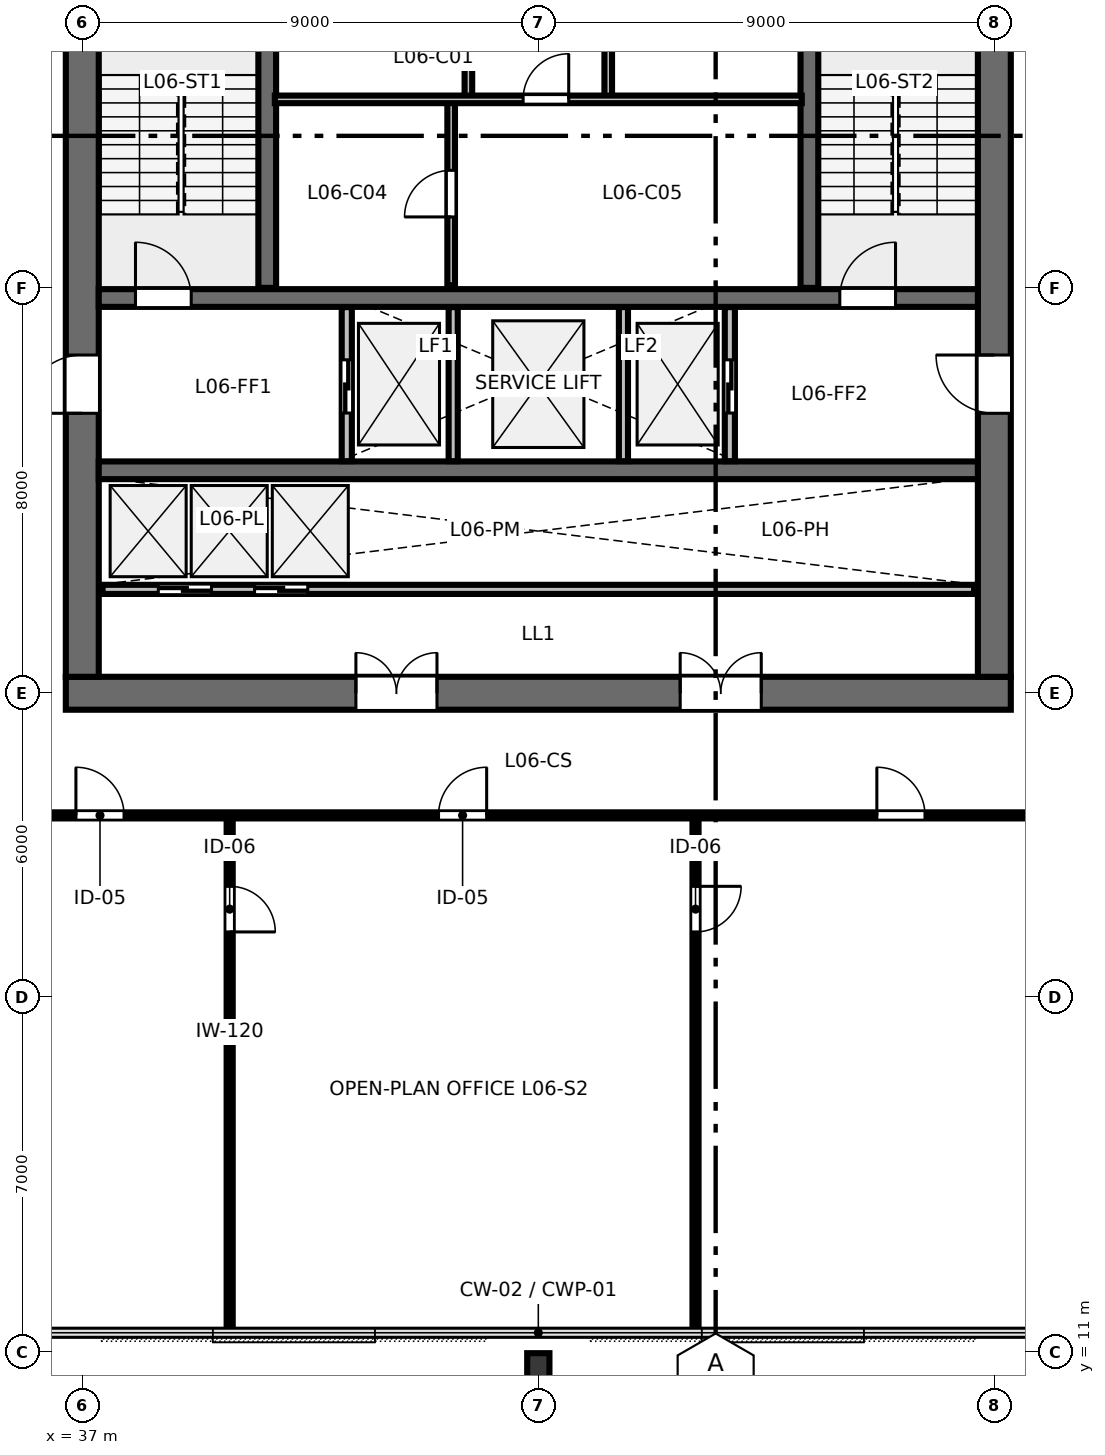
"""IFC4 building model, lengths in metres.
Left out: names, types, materials, properties, quantities, classifications, styles, units other than length and angle.
Written with IfcOpenShell. Run it as: python <this file> out.ifc"""

import sys

from ifc_helpers import new_model, si_unit, direction, frame, frame_2d, origin, origin_2d, place, context, subcontext, project, spatial, rectangle, i_section, extrude, element, fill, save


model = new_model("IFC4")
c1 = context("Model", 3, precision=1e-05, world=origin(), true_north=direction((0.0, 1.0)))
c2 = subcontext(c1, "Body", "Model", "MODEL_VIEW")
j1 = project(units=[si_unit("LENGTHUNIT", "METRE"), si_unit("PLANEANGLEUNIT", "RADIAN")], contexts=[c1])
p1 = place(None, origin())
s1 = spatial("IfcSite", under=j1, at=p1, CompositionType="ELEMENT")
p2 = place(p1, origin())
s2 = spatial("IfcBuilding", under=s1, at=p2, CompositionType="ELEMENT")
p3 = place(p2, frame((0.0, 0.0, 28.0)))
s3 = spatial("IfcBuildingStorey", under=s2, at=p3, CompositionType="ELEMENT", Elevation=28.0)
p4 = place(p3, frame((36.675, 24.0, 0.0), z_axis=(0.0, 0.0, 1.0), x_axis=(1.0, 0.0, 0.0)))
e1 = element("IfcWall", 1, at=p4, inside=s3, PredefinedType="SHEAR", context=c2, shape_type="SweptSolid", body=[
    extrude(rectangle(XDim=18.65, YDim=0.65, at=frame_2d((9.325, 0.0))), origin(), (0.0, 0.0, 1.0), 3.36),
])
p5 = place(p4, frame((5.725, 0.0, 0.0)))
e2 = element("IfcOpeningElement", 2, at=p5, cuts=e1, PredefinedType="OPENING", context=c2, shape_type="SweptSolid", body=[
    extrude(rectangle(XDim=1.6, YDim=2.15, at=frame_2d((0.8, 1.075))), frame((0.0, 0.335, 0.0), z_axis=(0.0, -1.0, 0.0), x_axis=(1.0, 0.0, 0.0)), (0.0, 0.0, 1.0), 0.67),
])
p6 = place(p4, frame((12.125, 0.0, 0.0)))
e3 = element("IfcOpeningElement", 3, at=p6, cuts=e1, PredefinedType="OPENING", context=c2, shape_type="SweptSolid", body=[
    extrude(rectangle(XDim=1.6, YDim=2.15, at=frame_2d((0.8, 1.075))), frame((0.0, 0.335, 0.0), z_axis=(0.0, -1.0, 0.0), x_axis=(1.0, 0.0, 0.0)), (0.0, 0.0, 1.0), 0.67),
])
p7 = place(p3, frame((37.0, 24.325, 0.0), z_axis=(0.0, 0.0, 1.0), x_axis=(0.0, 1.0, 0.0)))
e4 = element("IfcWall", 4, at=p7, inside=s3, PredefinedType="SHEAR", context=c2, shape_type="SweptSolid", body=[
    extrude(rectangle(XDim=15.35, YDim=0.65, at=frame_2d((7.675, 0.0))), origin(), (0.0, 0.0, 1.0), 3.36),
])
p8 = place(p7, frame((5.2, 0.0, 0.0)))
e5 = element("IfcOpeningElement", 5, at=p8, cuts=e4, PredefinedType="OPENING", context=c2, shape_type="SweptSolid", body=[
    extrude(rectangle(XDim=1.15, YDim=2.15, at=frame_2d((0.575, 1.075))), frame((0.0, 0.335, 0.0), z_axis=(0.0, -1.0, 0.0), x_axis=(1.0, 0.0, 0.0)), (0.0, 0.0, 1.0), 0.67),
])
p9 = place(p3, frame((55.0, 24.325, 0.0), z_axis=(0.0, 0.0, 1.0), x_axis=(0.0, 1.0, 0.0)))
e6 = element("IfcWall", 6, at=p9, inside=s3, PredefinedType="SHEAR", context=c2, shape_type="SweptSolid", body=[
    extrude(rectangle(XDim=15.35, YDim=0.65, at=frame_2d((7.675, 0.0))), origin(), (0.0, 0.0, 1.0), 3.36),
])
p10 = place(p9, frame((5.2, 0.0, 0.0)))
e7 = element("IfcOpeningElement", 7, at=p10, cuts=e6, PredefinedType="OPENING", context=c2, shape_type="SweptSolid", body=[
    extrude(rectangle(XDim=1.15, YDim=2.15, at=frame_2d((0.575, 1.075))), frame((0.0, 0.335, 0.0), z_axis=(0.0, -1.0, 0.0), x_axis=(1.0, 0.0, 0.0)), (0.0, 0.0, 1.0), 0.67),
])
p11 = place(p3, frame((37.325, 31.8, 0.0), z_axis=(0.0, 0.0, 1.0), x_axis=(1.0, 0.0, 0.0)))
e8 = element("IfcWall", 8, at=p11, inside=s3, PredefinedType="SHEAR", context=c2, shape_type="SweptSolid", body=[
    extrude(rectangle(XDim=17.35, YDim=0.35, at=frame_2d((8.675, 0.0))), origin(), (0.0, 0.0, 1.0), 3.36),
])
p12 = place(p11, frame((0.725, 0.0, 0.0)))
e9 = element("IfcOpeningElement", 9, at=p12, cuts=e8, PredefinedType="OPENING", context=c2, shape_type="SweptSolid", body=[
    extrude(rectangle(XDim=1.1, YDim=2.15, at=frame_2d((0.55, 1.075))), frame((0.0, 0.185, 0.0), z_axis=(0.0, -1.0, 0.0), x_axis=(1.0, 0.0, 0.0)), (0.0, 0.0, 1.0), 0.37),
])
p13 = place(p11, frame((14.625, 0.0, 0.0)))
e10 = element("IfcOpeningElement", 10, at=p13, cuts=e8, PredefinedType="OPENING", context=c2, shape_type="SweptSolid", body=[
    extrude(rectangle(XDim=1.1, YDim=2.15, at=frame_2d((0.55, 1.075))), frame((0.0, 0.185, 0.0), z_axis=(0.0, -1.0, 0.0), x_axis=(1.0, 0.0, 0.0)), (0.0, 0.0, 1.0), 0.37),
])
p14 = place(p3, frame((37.325, 28.4, 0.0), z_axis=(0.0, 0.0, 1.0), x_axis=(1.0, 0.0, 0.0)))
e11 = element("IfcWall", 11, at=p14, inside=s3, PredefinedType="SHEAR", context=c2, shape_type="SweptSolid", body=[
    extrude(rectangle(XDim=17.35, YDim=0.35, at=frame_2d((8.675, 0.0))), origin(), (0.0, 0.0, 1.0), 3.36),
])
p15 = place(p3, frame((46.0, 10.72, 0.0), z_axis=(0.0, 0.0, 1.0), x_axis=(1.0, 0.0, 0.0)))
e12 = element("IfcColumn", 12, at=p15, inside=s3, PredefinedType="COLUMN", context=c2, shape_type="SweptSolid", body=[
    extrude(i_section(OverallWidth=0.439, OverallDepth=0.514, WebThickness=0.06, FlangeThickness=0.097, FilletRadius=0.025, at=origin_2d()), origin(), (0.0, 0.0, 1.0), 3.358),
])
for number, where, z_axis, x_axis in (
    (13, (40.65, 32.0, 0.0), (0.0, 0.0, 1.0), (0.0, 1.0, 0.0)),
    (14, (51.35, 32.0, 0.0), (0.0, 0.0, 1.0), (0.0, 1.0, 0.0)),
):
    element("IfcWall", number, at=place(p3, frame(where, z_axis=z_axis, x_axis=x_axis)), inside=s3, PredefinedType="SHEAR", context=c2, shape_type="SweptSolid", body=[
        extrude(rectangle(XDim=7.7, YDim=0.35, at=frame_2d((3.85, 0.0))), origin(), (0.0, 0.0, 1.0), 3.6),
    ])
p16 = place(p3, frame((44.62, 35.72, 0.0), z_axis=(0.0, 0.0, 1.0), x_axis=(0.0, 1.0, 0.0)))
e15 = element("IfcWall", 15, at=p16, inside=s3, PredefinedType="PARTITIONING", context=c2, shape_type="SweptSolid", body=[
    extrude(rectangle(XDim=3.93, YDim=0.15, at=frame_2d((1.965, 0.0))), origin(), (0.0, 0.0, 1.0), 3.36),
])
p17 = place(p16, frame((1.5, 0.0, 0.0)))
e16 = element("IfcOpeningElement", 16, at=p17, cuts=e15, PredefinedType="OPENING", context=c2, shape_type="SweptSolid", body=[
    extrude(rectangle(XDim=0.9, YDim=2.15, at=frame_2d((0.45, 1.075))), frame((0.0, 0.085, 0.0), z_axis=(0.0, -1.0, 0.0), x_axis=(1.0, 0.0, 0.0)), (0.0, 0.0, 1.0), 0.17),
])
p18 = place(p3, frame((47.38, 35.72, 0.0), z_axis=(0.0, 0.0, 1.0), x_axis=(0.0, 1.0, 0.0)))
e17 = element("IfcWall", 17, at=p18, inside=s3, PredefinedType="PARTITIONING", context=c2, shape_type="SweptSolid", body=[
    extrude(rectangle(XDim=3.93, YDim=0.15, at=frame_2d((1.965, 0.0))), origin(), (0.0, 0.0, 1.0), 3.36),
])
p19 = place(p18, frame((1.5, 0.0, 0.0)))
e18 = element("IfcOpeningElement", 18, at=p19, cuts=e17, PredefinedType="OPENING", context=c2, shape_type="SweptSolid", body=[
    extrude(rectangle(XDim=0.9, YDim=2.15, at=frame_2d((0.45, 1.075))), frame((0.0, 0.085, 0.0), z_axis=(0.0, -1.0, 0.0), x_axis=(1.0, 0.0, 0.0)), (0.0, 0.0, 1.0), 0.17),
])
p20 = place(p3, frame((44.28, 32.05, 0.0), z_axis=(0.0, 0.0, 1.0), x_axis=(0.0, 1.0, 0.0)))
e19 = element("IfcWall", 19, at=p20, inside=s3, PredefinedType="PARTITIONING", context=c2, shape_type="SweptSolid", body=[
    extrude(rectangle(XDim=3.67, YDim=0.15, at=frame_2d((1.835, 0.0))), origin(), (0.0, 0.0, 1.0), 3.36),
])
p21 = place(p20, frame((1.35, 0.0, 0.0)))
e20 = element("IfcOpeningElement", 20, at=p21, cuts=e19, PredefinedType="OPENING", context=c2, shape_type="SweptSolid", body=[
    extrude(rectangle(XDim=0.92, YDim=2.15, at=frame_2d((0.46, 1.075))), frame((0.0, 0.085, 0.0), z_axis=(0.0, -1.0, 0.0), x_axis=(1.0, 0.0, 0.0)), (0.0, 0.0, 1.0), 0.17),
])
p22 = place(p3, frame((40.8, 35.72, 0.0), z_axis=(0.0, 0.0, 1.0), x_axis=(1.0, 0.0, 0.0)))
e21 = element("IfcWall", 21, at=p22, inside=s3, PredefinedType="PARTITIONING", context=c2, shape_type="SweptSolid", body=[
    extrude(rectangle(XDim=10.4, YDim=0.15, at=frame_2d((5.2, 0.0))), origin(), (0.0, 0.0, 1.0), 3.36),
])
p23 = place(p22, frame((4.9, 0.0, 0.0)))
e22 = element("IfcOpeningElement", 22, at=p23, cuts=e21, PredefinedType="OPENING", context=c2, shape_type="SweptSolid", body=[
    extrude(rectangle(XDim=0.9, YDim=2.15, at=frame_2d((0.45, 1.075))), frame((0.0, 0.085, 0.0), z_axis=(0.0, -1.0, 0.0), x_axis=(1.0, 0.0, 0.0)), (0.0, 0.0, 1.0), 0.17),
])
p24 = place(p3, frame((42.22, 28.58, 0.0), z_axis=(0.0, 0.0, 1.0), x_axis=(0.0, 1.0, 0.0)))
e23 = element("IfcWall", 23, at=p24, inside=s3, PredefinedType="PARTITIONING", context=c2, shape_type="SweptSolid", body=[
    extrude(rectangle(XDim=3.04, YDim=0.2, at=frame_2d((1.52, 0.0))), origin(), (0.0, 0.0, 1.0), 3.36),
])
p25 = place(p24, frame((0.95, 0.0, 0.0)))
e24 = element("IfcOpeningElement", 24, at=p25, cuts=e23, PredefinedType="OPENING", context=c2, shape_type="SweptSolid", body=[
    extrude(rectangle(XDim=1.05, YDim=2.15, at=frame_2d((0.525, 1.075))), frame((0.0, 0.11, 0.0), z_axis=(0.0, -1.0, 0.0), x_axis=(1.0, 0.0, 0.0)), (0.0, 0.0, 1.0), 0.22),
])
p26 = place(p3, frame((49.78, 28.58, 0.0), z_axis=(0.0, 0.0, 1.0), x_axis=(0.0, 1.0, 0.0)))
e25 = element("IfcWall", 25, at=p26, inside=s3, PredefinedType="PARTITIONING", context=c2, shape_type="SweptSolid", body=[
    extrude(rectangle(XDim=3.04, YDim=0.2, at=frame_2d((1.52, 0.0))), origin(), (0.0, 0.0, 1.0), 3.36),
])
p27 = place(p26, frame((0.95, 0.0, 0.0)))
e26 = element("IfcOpeningElement", 26, at=p27, cuts=e25, PredefinedType="OPENING", context=c2, shape_type="SweptSolid", body=[
    extrude(rectangle(XDim=1.05, YDim=2.15, at=frame_2d((0.525, 1.075))), frame((0.0, 0.11, 0.0), z_axis=(0.0, -1.0, 0.0), x_axis=(1.0, 0.0, 0.0)), (0.0, 0.0, 1.0), 0.22),
])
for number, where, z_axis, x_axis in (
    (27, (44.32, 28.58, 0.0), (0.0, 0.0, 1.0), (0.0, 1.0, 0.0)),
    (28, (47.68, 28.58, 0.0), (0.0, 0.0, 1.0), (0.0, 1.0, 0.0)),
):
    element("IfcWall", number, at=place(p3, frame(where, z_axis=z_axis, x_axis=x_axis)), inside=s3, PredefinedType="PARTITIONING", context=c2, shape_type="SweptSolid", body=[
        extrude(rectangle(XDim=3.04, YDim=0.18, at=frame_2d((1.52, 0.0))), origin(), (0.0, 0.0, 1.0), 3.36),
    ])
p28 = place(p3, frame((37.4, 26.05, 0.0), z_axis=(0.0, 0.0, 1.0), x_axis=(1.0, 0.0, 0.0)))
e29 = element("IfcWall", 29, at=p28, inside=s3, PredefinedType="PARTITIONING", context=c2, shape_type="SweptSolid", body=[
    extrude(rectangle(XDim=17.2, YDim=0.18, at=frame_2d((8.6, 0.0))), origin(), (0.0, 0.0, 1.0), 3.36),
])
p29 = place(p28, frame((1.1, 0.0, 0.0)))
e30 = element("IfcOpeningElement", 30, at=p29, cuts=e29, PredefinedType="OPENING", context=c2, shape_type="SweptSolid", body=[
    extrude(rectangle(XDim=1.05, YDim=2.15, at=frame_2d((0.525, 1.075))), frame((0.0, 0.1, 0.0), z_axis=(0.0, -1.0, 0.0), x_axis=(1.0, 0.0, 0.0)), (0.0, 0.0, 1.0), 0.2),
])
p30 = place(p28, frame((3.0, 0.0, 0.0)))
e31 = element("IfcOpeningElement", 31, at=p30, cuts=e29, PredefinedType="OPENING", context=c2, shape_type="SweptSolid", body=[
    extrude(rectangle(XDim=1.05, YDim=2.15, at=frame_2d((0.525, 1.075))), frame((0.0, 0.1, 0.0), z_axis=(0.0, -1.0, 0.0), x_axis=(1.0, 0.0, 0.0)), (0.0, 0.0, 1.0), 0.2),
])
p31 = place(p3, frame((39.909, 21.59, 0.0), z_axis=(0.0, 0.0, 1.0), x_axis=(0.0, -1.0, 0.0)))
e32 = element("IfcWall", 32, at=p31, inside=s3, PredefinedType="PARTITIONING", context=c2, shape_type="SweptSolid", body=[
    extrude(rectangle(XDim=10.21, YDim=0.12, at=frame_2d((5.105, 0.0))), origin(), (0.0, 0.0, 1.0), 2.64),
])
p32 = place(p31, frame((1.4, 0.0, 0.0)))
e33 = element("IfcOpeningElement", 33, at=p32, cuts=e32, PredefinedType="OPENING", context=c2, shape_type="SweptSolid", body=[
    extrude(rectangle(XDim=0.9, YDim=2.15, at=frame_2d((0.45, 1.075))), frame((0.0, 0.07, 0.0), z_axis=(0.0, -1.0, 0.0), x_axis=(1.0, 0.0, 0.0)), (0.0, 0.0, 1.0), 0.14),
])
p33 = place(p3, frame((49.102, 21.59, 0.0), z_axis=(0.0, 0.0, 1.0), x_axis=(0.0, -1.0, 0.0)))
e34 = element("IfcWall", 34, at=p33, inside=s3, PredefinedType="PARTITIONING", context=c2, shape_type="SweptSolid", body=[
    extrude(rectangle(XDim=10.21, YDim=0.12, at=frame_2d((5.105, 0.0))), origin(), (0.0, 0.0, 1.0), 2.64),
])
p34 = place(p33, frame((1.4, 0.0, 0.0)))
e35 = element("IfcOpeningElement", 35, at=p34, cuts=e34, PredefinedType="OPENING", context=c2, shape_type="SweptSolid", body=[
    extrude(rectangle(XDim=0.9, YDim=2.15, at=frame_2d((0.45, 1.075))), frame((0.0, 0.07, 0.0), z_axis=(0.0, -1.0, 0.0), x_axis=(1.0, 0.0, 0.0)), (0.0, 0.0, 1.0), 0.14),
])
p35 = place(p3, frame((34.65, 21.59, 0.0), z_axis=(0.0, 0.0, 1.0), x_axis=(1.0, 0.0, 0.0)))
e36 = element("IfcWall", 36, at=p35, inside=s3, PredefinedType="PARTITIONING", context=c2, shape_type="SweptSolid", body=[
    extrude(rectangle(XDim=22.7, YDim=0.12, at=frame_2d((11.35, 0.0))), origin(), (0.0, 0.0, 1.0), 2.64),
])
p36 = place(p35, frame((2.224, 0.0, 0.0)))
e37 = element("IfcOpeningElement", 37, at=p36, cuts=e36, PredefinedType="OPENING", context=c2, shape_type="SweptSolid", body=[
    extrude(rectangle(XDim=0.95, YDim=2.15, at=frame_2d((0.475, 1.075))), frame((0.0, 0.07, 0.0), z_axis=(0.0, -1.0, 0.0), x_axis=(1.0, 0.0, 0.0)), (0.0, 0.0, 1.0), 0.14),
])
p37 = place(p35, frame((9.381, 0.0, 0.0)))
e38 = element("IfcOpeningElement", 38, at=p37, cuts=e36, PredefinedType="OPENING", context=c2, shape_type="SweptSolid", body=[
    extrude(rectangle(XDim=0.95, YDim=2.15, at=frame_2d((0.475, 1.075))), frame((0.0, 0.07, 0.0), z_axis=(0.0, -1.0, 0.0), x_axis=(1.0, 0.0, 0.0)), (0.0, 0.0, 1.0), 0.14),
])
p38 = place(p35, frame((18.031, 0.0, 0.0)))
e39 = element("IfcOpeningElement", 39, at=p38, cuts=e36, PredefinedType="OPENING", context=c2, shape_type="SweptSolid", body=[
    extrude(rectangle(XDim=0.95, YDim=2.15, at=frame_2d((0.475, 1.075))), frame((0.0, 0.07, 0.0), z_axis=(0.0, -1.0, 0.0), x_axis=(1.0, 0.0, 0.0)), (0.0, 0.0, 1.0), 0.14),
])
p39 = place(p12, origin())
e40 = element("IfcDoor", 40, at=p39, inside=s3, OperationType="SINGLE_SWING_LEFT", PredefinedType="DOOR", context=c2, shape_type="SweptSolid", body=[
    extrude(rectangle(XDim=1.1, YDim=2.15, at=frame_2d((0.55, 1.075))), frame((0.0, 0.025, 0.0), z_axis=(0.0, -1.0, 0.0), x_axis=(1.0, 0.0, 0.0)), (0.0, 0.0, 1.0), 0.05),
])
fill(e9, e40)
p40 = place(p13, origin())
e41 = element("IfcDoor", 41, at=p40, inside=s3, OperationType="SINGLE_SWING_RIGHT", PredefinedType="DOOR", context=c2, shape_type="SweptSolid", body=[
    extrude(rectangle(XDim=1.1, YDim=2.15, at=frame_2d((0.55, 1.075))), frame((0.0, 0.025, 0.0), z_axis=(0.0, -1.0, 0.0), x_axis=(1.0, 0.0, 0.0)), (0.0, 0.0, 1.0), 0.05),
])
fill(e10, e41)
p41 = place(p8, origin())
e42 = element("IfcDoor", 42, at=p41, inside=s3, OperationType="SINGLE_SWING_LEFT", PredefinedType="DOOR", context=c2, shape_type="SweptSolid", body=[
    extrude(rectangle(XDim=1.15, YDim=2.15, at=frame_2d((0.575, 1.075))), frame((0.0, 0.025, 0.0), z_axis=(0.0, -1.0, 0.0), x_axis=(1.0, 0.0, 0.0)), (0.0, 0.0, 1.0), 0.05),
])
fill(e5, e42)
p42 = place(p10, origin())
e43 = element("IfcDoor", 43, at=p42, inside=s3, OperationType="SINGLE_SWING_RIGHT", PredefinedType="DOOR", context=c2, shape_type="SweptSolid", body=[
    extrude(rectangle(XDim=1.15, YDim=2.15, at=frame_2d((0.575, 1.075))), frame((0.0, 0.025, 0.0), z_axis=(0.0, -1.0, 0.0), x_axis=(1.0, 0.0, 0.0)), (0.0, 0.0, 1.0), 0.05),
])
fill(e7, e43)
p43 = place(p5, origin())
e44 = element("IfcDoor", 44, at=p43, inside=s3, OperationType="DOUBLE_DOOR_SINGLE_SWING", PredefinedType="DOOR", context=c2, shape_type="SweptSolid", body=[
    extrude(rectangle(XDim=1.6, YDim=2.15, at=frame_2d((0.8, 1.075))), frame((0.0, 0.025, 0.0), z_axis=(0.0, -1.0, 0.0), x_axis=(1.0, 0.0, 0.0)), (0.0, 0.0, 1.0), 0.05),
])
fill(e2, e44)
p44 = place(p6, origin())
e45 = element("IfcDoor", 45, at=p44, inside=s3, OperationType="DOUBLE_DOOR_SINGLE_SWING", PredefinedType="DOOR", context=c2, shape_type="SweptSolid", body=[
    extrude(rectangle(XDim=1.6, YDim=2.15, at=frame_2d((0.8, 1.075))), frame((0.0, 0.025, 0.0), z_axis=(0.0, -1.0, 0.0), x_axis=(1.0, 0.0, 0.0)), (0.0, 0.0, 1.0), 0.05),
])
fill(e3, e45)
p45 = place(p21, origin())
e46 = element("IfcDoor", 46, at=p45, inside=s3, OperationType="SINGLE_SWING_LEFT", PredefinedType="DOOR", context=c2, shape_type="SweptSolid", body=[
    extrude(rectangle(XDim=0.92, YDim=2.15, at=frame_2d((0.46, 1.075))), frame((0.0, 0.025, 0.0), z_axis=(0.0, -1.0, 0.0), x_axis=(1.0, 0.0, 0.0)), (0.0, 0.0, 1.0), 0.05),
])
fill(e20, e46)
p46 = place(p23, origin())
e47 = element("IfcDoor", 47, at=p46, inside=s3, OperationType="SINGLE_SWING_RIGHT", PredefinedType="DOOR", context=c2, shape_type="SweptSolid", body=[
    extrude(rectangle(XDim=0.9, YDim=2.15, at=frame_2d((0.45, 1.075))), frame((0.0, 0.025, 0.0), z_axis=(0.0, -1.0, 0.0), x_axis=(1.0, 0.0, 0.0)), (0.0, 0.0, 1.0), 0.05),
])
fill(e22, e47)
p47 = place(p25, origin())
e48 = element("IfcDoor", 48, at=p47, inside=s3, OperationType="SLIDING_TO_LEFT", PredefinedType="DOOR", context=c2, shape_type="SweptSolid", body=[
    extrude(rectangle(XDim=1.05, YDim=2.15, at=frame_2d((0.525, 1.075))), frame((0.0, 0.025, 0.0), z_axis=(0.0, -1.0, 0.0), x_axis=(1.0, 0.0, 0.0)), (0.0, 0.0, 1.0), 0.05),
])
fill(e24, e48)
p48 = place(p27, origin())
e49 = element("IfcDoor", 49, at=p48, inside=s3, OperationType="SLIDING_TO_RIGHT", PredefinedType="DOOR", context=c2, shape_type="SweptSolid", body=[
    extrude(rectangle(XDim=1.05, YDim=2.15, at=frame_2d((0.525, 1.075))), frame((0.0, 0.025, 0.0), z_axis=(0.0, -1.0, 0.0), x_axis=(1.0, 0.0, 0.0)), (0.0, 0.0, 1.0), 0.05),
])
fill(e26, e49)
p49 = place(p29, origin())
e50 = element("IfcDoor", 50, at=p49, inside=s3, OperationType="SLIDING_TO_LEFT", PredefinedType="DOOR", context=c2, shape_type="SweptSolid", body=[
    extrude(rectangle(XDim=1.05, YDim=2.15, at=frame_2d((0.525, 1.075))), frame((0.0, 0.025, 0.0), z_axis=(0.0, -1.0, 0.0), x_axis=(1.0, 0.0, 0.0)), (0.0, 0.0, 1.0), 0.05),
])
fill(e30, e50)
p50 = place(p30, origin())
e51 = element("IfcDoor", 51, at=p50, inside=s3, OperationType="SLIDING_TO_RIGHT", PredefinedType="DOOR", context=c2, shape_type="SweptSolid", body=[
    extrude(rectangle(XDim=1.05, YDim=2.15, at=frame_2d((0.525, 1.075))), frame((0.0, 0.025, 0.0), z_axis=(0.0, -1.0, 0.0), x_axis=(1.0, 0.0, 0.0)), (0.0, 0.0, 1.0), 0.05),
])
fill(e31, e51)
p51 = place(p32, origin())
e52 = element("IfcDoor", 52, at=p51, inside=s3, OperationType="SINGLE_SWING_RIGHT", PredefinedType="DOOR", context=c2, shape_type="SweptSolid", body=[
    extrude(rectangle(XDim=0.9, YDim=2.15, at=frame_2d((0.45, 1.075))), frame((0.0, 0.025, 0.0), z_axis=(0.0, -1.0, 0.0), x_axis=(1.0, 0.0, 0.0)), (0.0, 0.0, 1.0), 0.05),
])
fill(e33, e52)
p52 = place(p34, origin())
e53 = element("IfcDoor", 53, at=p52, inside=s3, OperationType="SINGLE_SWING_LEFT", PredefinedType="DOOR", context=c2, shape_type="SweptSolid", body=[
    extrude(rectangle(XDim=0.9, YDim=2.15, at=frame_2d((0.45, 1.075))), frame((0.0, 0.025, 0.0), z_axis=(0.0, -1.0, 0.0), x_axis=(1.0, 0.0, 0.0)), (0.0, 0.0, 1.0), 0.05),
])
fill(e35, e53)
p53 = place(p36, origin())
e54 = element("IfcDoor", 54, at=p53, inside=s3, OperationType="SINGLE_SWING_LEFT", PredefinedType="DOOR", context=c2, shape_type="SweptSolid", body=[
    extrude(rectangle(XDim=0.95, YDim=2.15, at=frame_2d((0.475, 1.075))), frame((0.0, 0.025, 0.0), z_axis=(0.0, -1.0, 0.0), x_axis=(1.0, 0.0, 0.0)), (0.0, 0.0, 1.0), 0.05),
])
fill(e37, e54)
p54 = place(p37, origin())
e55 = element("IfcDoor", 55, at=p54, inside=s3, OperationType="SINGLE_SWING_RIGHT", PredefinedType="DOOR", context=c2, shape_type="SweptSolid", body=[
    extrude(rectangle(XDim=0.95, YDim=2.15, at=frame_2d((0.475, 1.075))), frame((0.0, 0.025, 0.0), z_axis=(0.0, -1.0, 0.0), x_axis=(1.0, 0.0, 0.0)), (0.0, 0.0, 1.0), 0.05),
])
fill(e38, e55)
p55 = place(p38, origin())
e56 = element("IfcDoor", 56, at=p55, inside=s3, OperationType="SINGLE_SWING_LEFT", PredefinedType="DOOR", context=c2, shape_type="SweptSolid", body=[
    extrude(rectangle(XDim=0.95, YDim=2.15, at=frame_2d((0.475, 1.075))), frame((0.0, 0.025, 0.0), z_axis=(0.0, -1.0, 0.0), x_axis=(1.0, 0.0, 0.0)), (0.0, 0.0, 1.0), 0.05),
])
fill(e39, e56)
save(model, sys.argv[1])
